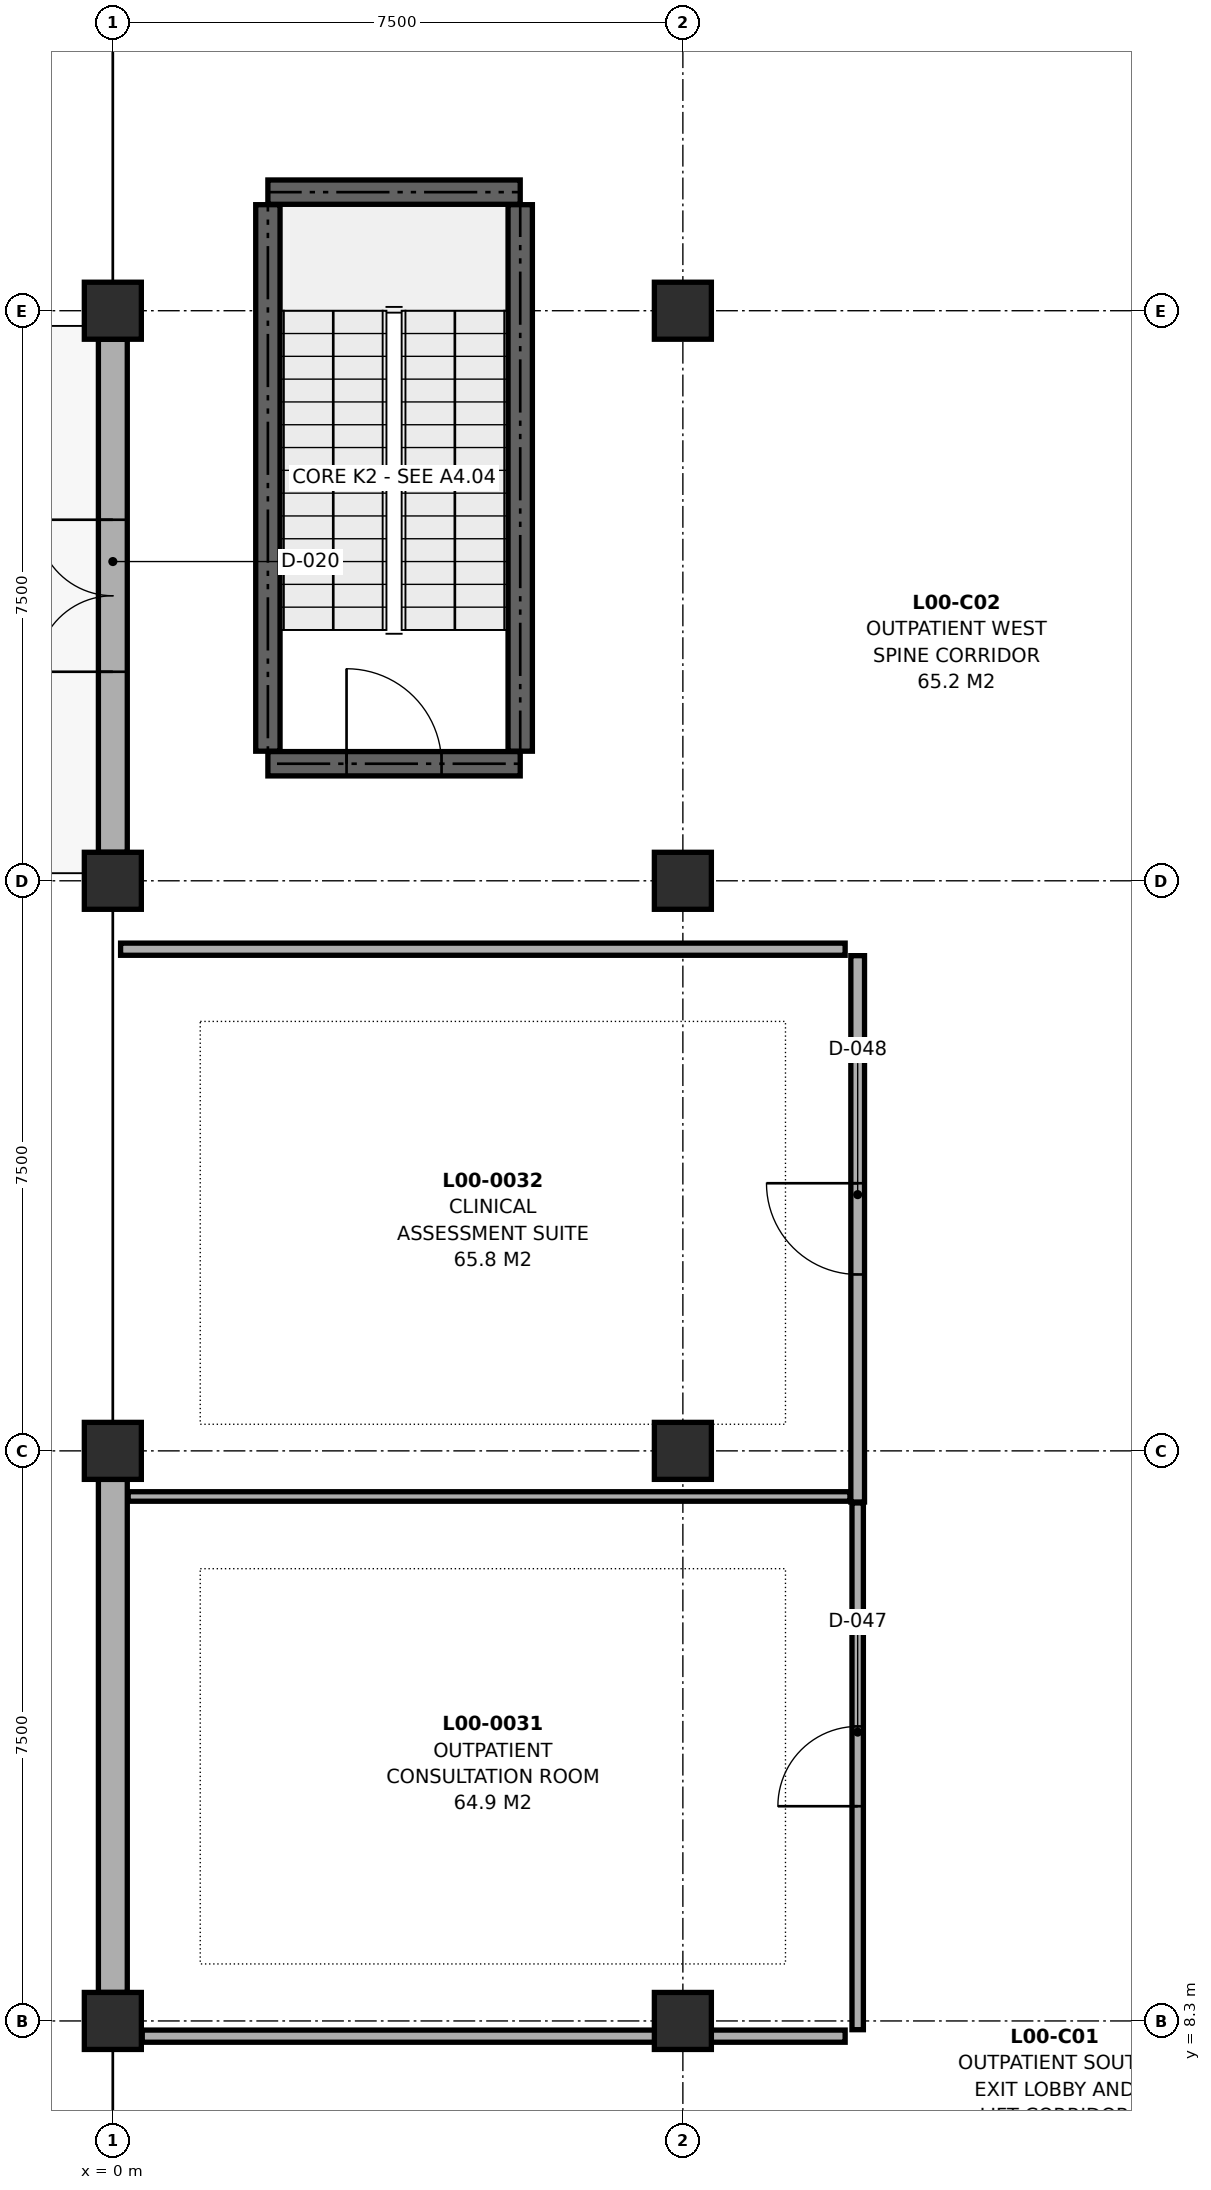
"""IFC4 building model, lengths in metres.
Left out: names, types, materials, properties, quantities, classifications, styles, units other than length and angle.
Written with IfcOpenShell. Run it as: python <this file> out.ifc"""

import sys

from ifc_helpers import new_model, si_unit, direction, frame, frame_2d, origin, origin_2d, place, context, subcontext, project, spatial, rectangle, extrude, element, fill, save


model = new_model("IFC4")
c1 = context("Model", 3, precision=1e-05, world=origin(), true_north=direction((0.0, 1.0)))
c2 = subcontext(c1, "Body", "Model", "MODEL_VIEW")
j1 = project(units=[si_unit("LENGTHUNIT", "METRE"), si_unit("PLANEANGLEUNIT", "RADIAN")], contexts=[c1])
p1 = place(None, origin())
s1 = spatial("IfcSite", under=j1, at=p1, CompositionType="ELEMENT")
p2 = place(p1, origin())
s2 = spatial("IfcBuilding", under=s1, at=p2, CompositionType="ELEMENT")
p3 = place(p2, origin())
s3 = spatial("IfcBuildingStorey", under=s2, at=p3, CompositionType="ELEMENT", Elevation=0.0)
for number, where, z_axis, x_axis in (
    (1, (0.0, 8.3, 0.0), (0.0, 0.0, 1.0), (1.0, 0.0, 0.0)),
    (2, (0.0, 15.8, 0.0), (0.0, 0.0, 1.0), (1.0, 0.0, 0.0)),
    (3, (0.0, 23.3, 0.0), (0.0, 0.0, 1.0), (1.0, 0.0, 0.0)),
    (4, (0.0, 30.8, 0.0), (0.0, 0.0, 1.0), (1.0, 0.0, 0.0)),
    (5, (7.5, 8.3, 0.0), (0.0, 0.0, 1.0), (1.0, 0.0, 0.0)),
    (6, (7.5, 15.8, 0.0), (0.0, 0.0, 1.0), (1.0, 0.0, 0.0)),
    (7, (7.5, 23.3, 0.0), (0.0, 0.0, 1.0), (1.0, 0.0, 0.0)),
    (8, (7.5, 30.8, 0.0), (0.0, 0.0, 1.0), (1.0, 0.0, 0.0)),
):
    element("IfcColumn", number, at=place(p3, frame(where, z_axis=z_axis, x_axis=x_axis)), inside=s3, PredefinedType="COLUMN", context=c2, shape_type="SweptSolid", body=[
        extrude(rectangle(XDim=0.75, YDim=0.75, at=origin_2d()), origin(), (0.0, 0.0, 1.0), 4.7),
    ])
p4 = place(p3, frame((0.0, 8.675, 0.0), z_axis=(0.0, 0.0, 1.0), x_axis=(0.0, 1.0, 0.0)))
e9 = element("IfcWall", 9, at=p4, inside=s3, PredefinedType="SOLIDWALL", context=c2, shape_type="SweptSolid", body=[
    extrude(rectangle(XDim=6.75, YDim=0.38, at=frame_2d((3.375, 0.0))), origin(), (0.0, 0.0, 1.0), 4.035),
])
p5 = place(p3, frame((0.0, 23.675, 0.0), z_axis=(0.0, 0.0, 1.0), x_axis=(0.0, 1.0, 0.0)))
e10 = element("IfcWall", 10, at=p5, inside=s3, PredefinedType="SOLIDWALL", context=c2, shape_type="SweptSolid", body=[
    extrude(rectangle(XDim=6.75, YDim=0.38, at=frame_2d((3.375, 0.0))), origin(), (0.0, 0.0, 1.0), 4.035),
])
p6 = place(p5, frame((2.375, 0.0, 0.0)))
e11 = element("IfcOpeningElement", 11, at=p6, cuts=e10, PredefinedType="OPENING", context=c2, shape_type="SweptSolid", body=[
    extrude(rectangle(XDim=2.0, YDim=2.35, at=frame_2d((1.0, 1.175))), frame((0.0, 0.202, 0.0), z_axis=(0.0, -1.0, 0.0), x_axis=(1.0, 0.0, 0.0)), (0.0, 0.0, 1.0), 0.404),
])
p7 = place(p3, frame((5.36, 25.005, 0.0), z_axis=(0.0, 0.0, 1.0), x_axis=(0.0, 1.0, 0.0)))
e12 = element("IfcWall", 12, at=p7, inside=s3, PredefinedType="SHEAR", context=c2, shape_type="SweptSolid", body=[
    extrude(rectangle(XDim=7.19, YDim=0.32, at=frame_2d((3.595, 0.0))), origin(), (0.0, 0.0, 1.0), 4.7),
])
p8 = place(p3, frame((5.36, 32.36, 0.0), z_axis=(0.0, 0.0, 1.0), x_axis=(-1.0, 0.0, 0.0)))
e13 = element("IfcWall", 13, at=p8, inside=s3, PredefinedType="SHEAR", context=c2, shape_type="SweptSolid", body=[
    extrude(rectangle(XDim=3.32, YDim=0.32, at=frame_2d((1.66, 0.0))), origin(), (0.0, 0.0, 1.0), 4.7),
])
p9 = place(p3, frame((2.04, 32.195, 0.0), z_axis=(0.0, 0.0, 1.0), x_axis=(0.0, -1.0, 0.0)))
e14 = element("IfcWall", 14, at=p9, inside=s3, PredefinedType="SHEAR", context=c2, shape_type="SweptSolid", body=[
    extrude(rectangle(XDim=7.19, YDim=0.32, at=frame_2d((3.595, 0.0))), origin(), (0.0, 0.0, 1.0), 4.7),
])
p10 = place(p3, frame((2.04, 24.84, 0.0), z_axis=(0.0, 0.0, 1.0), x_axis=(1.0, 0.0, 0.0)))
e15 = element("IfcWall", 15, at=p10, inside=s3, PredefinedType="SHEAR", context=c2, shape_type="SweptSolid", body=[
    extrude(rectangle(XDim=3.32, YDim=0.32, at=frame_2d((1.66, 0.0))), origin(), (0.0, 0.0, 1.0), 4.7),
])
p11 = place(p10, frame((1.035, 0.0, 0.0)))
e16 = element("IfcOpeningElement", 16, at=p11, cuts=e15, PredefinedType="OPENING", context=c2, shape_type="SweptSolid", body=[
    extrude(rectangle(XDim=1.25, YDim=2.2, at=frame_2d((0.625, 1.1))), frame((0.0, 0.172, 0.0), z_axis=(0.0, -1.0, 0.0), x_axis=(1.0, 0.0, 0.0)), (0.0, 0.0, 1.0), 0.344),
])
p12 = place(p3, frame((9.8, 8.185, 0.0), z_axis=(0.0, 0.0, 1.0), x_axis=(0.0, 1.0, 0.0)))
e17 = element("IfcWall", 17, at=p12, inside=s3, PredefinedType="PARTITIONING", context=c2, shape_type="SweptSolid", body=[
    extrude(rectangle(XDim=6.93, YDim=0.15, at=frame_2d((3.465, 0.0))), origin(), (0.0, 0.0, 1.0), 3.765),
])
p13 = place(p12, frame((2.94, 0.0, 0.0)))
e18 = element("IfcOpeningElement", 18, at=p13, cuts=e17, PredefinedType="OPENING", context=c2, shape_type="SweptSolid", body=[
    extrude(rectangle(XDim=1.05, YDim=2.15, at=frame_2d((0.525, 1.075))), frame((0.0, 0.087, 0.0), z_axis=(0.0, -1.0, 0.0), x_axis=(1.0, 0.0, 0.0)), (0.0, 0.0, 1.0), 0.174),
])
p14 = place(p3, frame((9.8, 15.127, 0.0), z_axis=(0.0, 0.0, 1.0), x_axis=(0.0, 1.0, 0.0)))
e19 = element("IfcWall", 19, at=p14, inside=s3, PredefinedType="PARTITIONING", context=c2, shape_type="SweptSolid", body=[
    extrude(rectangle(XDim=7.188, YDim=0.18, at=frame_2d((3.594, 0.0))), origin(), (0.0, 0.0, 1.0), 3.765),
])
p15 = place(p14, frame((2.994, 0.0, 0.0)))
e20 = element("IfcOpeningElement", 20, at=p15, cuts=e19, PredefinedType="OPENING", context=c2, shape_type="SweptSolid", body=[
    extrude(rectangle(XDim=1.2, YDim=2.15, at=frame_2d((0.6, 1.075))), frame((0.0, 0.102, 0.0), z_axis=(0.0, -1.0, 0.0), x_axis=(1.0, 0.0, 0.0)), (0.0, 0.0, 1.0), 0.204),
])
p16 = place(p3, frame((0.387, 8.1, 0.0), z_axis=(0.0, 0.0, 1.0), x_axis=(1.0, 0.0, 0.0)))
e21 = element("IfcWall", 21, at=p16, inside=s3, PredefinedType="PARTITIONING", context=c2, shape_type="SweptSolid", body=[
    extrude(rectangle(XDim=9.248, YDim=0.16, at=frame_2d((4.624, 0.0))), origin(), (0.0, 0.0, 1.0), 3.765),
])
p17 = place(p3, frame((0.202, 15.2, 0.0), z_axis=(0.0, 0.0, 1.0), x_axis=(1.0, 0.0, 0.0)))
e22 = element("IfcWall", 22, at=p17, inside=s3, PredefinedType="PARTITIONING", context=c2, shape_type="SweptSolid", body=[
    extrude(rectangle(XDim=9.496, YDim=0.125, at=frame_2d((4.748, 0.0))), origin(), (0.0, 0.0, 1.0), 3.765),
])
p18 = place(p3, frame((0.102, 22.4, 0.0), z_axis=(0.0, 0.0, 1.0), x_axis=(1.0, 0.0, 0.0)))
e23 = element("IfcWall", 23, at=p18, inside=s3, PredefinedType="PARTITIONING", context=c2, shape_type="SweptSolid", body=[
    extrude(rectangle(XDim=9.533, YDim=0.16, at=frame_2d((4.767, 0.0))), origin(), (0.0, 0.0, 1.0), 3.765),
])
p19 = place(p6, origin())
e24 = element("IfcDoor", 24, at=p19, inside=s3, OperationType="DOUBLE_DOOR_SINGLE_SWING", PredefinedType="DOOR", context=c2, shape_type="SweptSolid", body=[
    extrude(rectangle(XDim=2.0, YDim=2.35, at=frame_2d((1.0, 1.175))), frame((0.0, 0.025, 0.0), z_axis=(0.0, -1.0, 0.0), x_axis=(1.0, 0.0, 0.0)), (0.0, 0.0, 1.0), 0.05),
])
fill(e11, e24)
p20 = place(p11, origin())
e25 = element("IfcDoor", 25, at=p20, inside=s3, OperationType="SINGLE_SWING_LEFT", PredefinedType="DOOR", context=c2, shape_type="SweptSolid", body=[
    extrude(rectangle(XDim=1.25, YDim=2.2, at=frame_2d((0.625, 1.1))), frame((0.0, 0.025, 0.0), z_axis=(0.0, -1.0, 0.0), x_axis=(1.0, 0.0, 0.0)), (0.0, 0.0, 1.0), 0.05),
])
fill(e16, e25)
p21 = place(p13, origin())
e26 = element("IfcDoor", 26, at=p21, inside=s3, OperationType="SINGLE_SWING_LEFT", PredefinedType="DOOR", context=c2, shape_type="SweptSolid", body=[
    extrude(rectangle(XDim=1.05, YDim=2.15, at=frame_2d((0.525, 1.075))), frame((0.0, 0.025, 0.0), z_axis=(0.0, -1.0, 0.0), x_axis=(1.0, 0.0, 0.0)), (0.0, 0.0, 1.0), 0.05),
])
fill(e18, e26)
p22 = place(p15, origin())
e27 = element("IfcDoor", 27, at=p22, inside=s3, OperationType="SINGLE_SWING_RIGHT", PredefinedType="DOOR", context=c2, shape_type="SweptSolid", body=[
    extrude(rectangle(XDim=1.2, YDim=2.15, at=frame_2d((0.6, 1.075))), frame((0.0, 0.025, 0.0), z_axis=(0.0, -1.0, 0.0), x_axis=(1.0, 0.0, 0.0)), (0.0, 0.0, 1.0), 0.05),
])
fill(e20, e27)
save(model, sys.argv[1])
